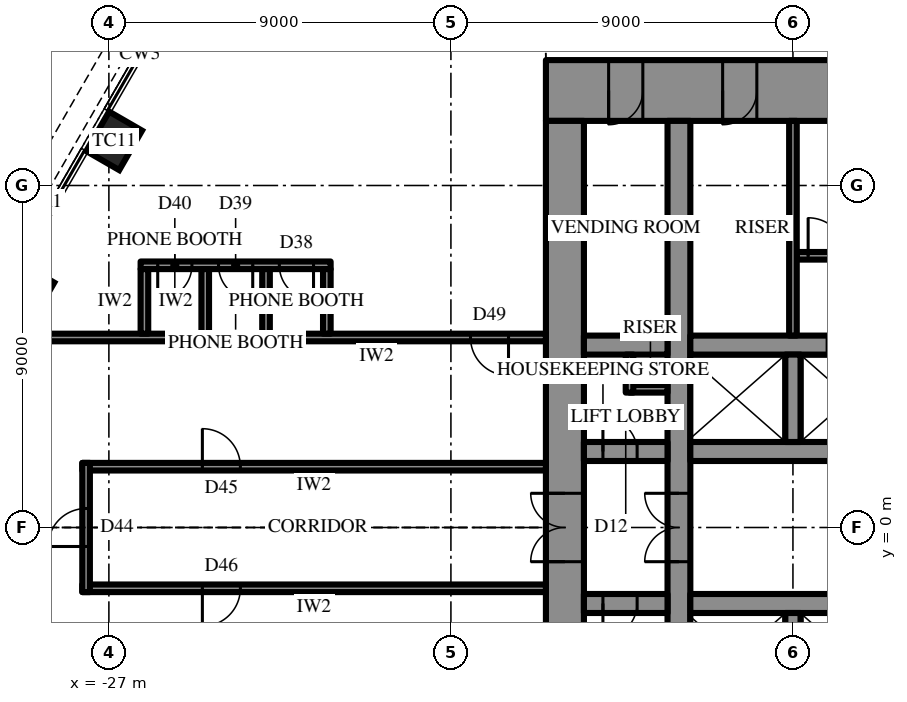
"""IFC4 building model, lengths in metres.
Left out: names, types, materials, properties, quantities, classifications, styles, units other than length and angle.
Written with IfcOpenShell. Run it as: python <this file> out.ifc"""

import sys

from ifc_helpers import new_model, si_unit, direction, frame, frame_2d, origin, origin_2d, place, context, subcontext, project, spatial, rectangle, extrude, element, fill, save


model = new_model("IFC4")
c1 = context("Model", 3, precision=1e-05, world=origin(), true_north=direction((0.0, 1.0)))
c2 = subcontext(c1, "Body", "Model", "MODEL_VIEW")
j1 = project(units=[si_unit("LENGTHUNIT", "METRE"), si_unit("PLANEANGLEUNIT", "RADIAN")], contexts=[c1])
p1 = place(None, origin())
s1 = spatial("IfcSite", under=j1, at=p1, CompositionType="ELEMENT")
p2 = place(p1, origin())
s2 = spatial("IfcBuilding", under=s1, at=p2, CompositionType="ELEMENT")
p3 = place(p2, frame((0.0, 0.0, 274.3)))
s3 = spatial("IfcBuildingStorey", under=s2, at=p3, CompositionType="ELEMENT", Elevation=274.3)
for number, where, z_axis, x_axis in (
    (1, (-26.861, 10.175, 0.0), (0.0, 0.0, 1.0), (-0.5, -0.866, 0.0)),
    (2, (-29.171, 6.175, 0.0), (0.0, 0.0, 1.0), (-0.5, -0.866, 0.0)),
):
    element("IfcColumn", number, at=place(p3, frame(where, z_axis=z_axis, x_axis=x_axis)), inside=s3, PredefinedType="COLUMN", context=c2, shape_type="SweptSolid", body=[
        extrude(rectangle(XDim=1.2, YDim=1.0, at=origin_2d()), origin(), (0.0, 0.0, 1.0), 4.2),
    ])
p4 = place(p3, frame((-15.5, 11.5, 0.0), z_axis=(0.0, 0.0, 1.0), x_axis=(1.0, 0.0, 0.0)))
e3 = element("IfcWall", 3, at=p4, inside=s3, PredefinedType="SHEAR", context=c2, shape_type="SweptSolid", body=[
    extrude(rectangle(XDim=31.0, YDim=1.6, at=frame_2d((15.5, 0.0))), origin(), (0.0, 0.0, 1.0), 4.2),
])
p5 = place(p4, frame((16.35, 0.0, 0.0)))
e4 = element("IfcOpeningElement", 4, at=p5, cuts=e3, PredefinedType="OPENING", context=c2, shape_type="SweptSolid", body=[
    extrude(rectangle(XDim=0.9, YDim=2.2, at=frame_2d((0.45, 1.1))), frame((0.0, 0.81, 0.0), z_axis=(0.0, -1.0, 0.0), x_axis=(1.0, 0.0, 0.0)), (0.0, 0.0, 1.0), 1.62),
])
p6 = place(p4, frame((19.35, 0.0, 0.0)))
e5 = element("IfcOpeningElement", 5, at=p6, cuts=e3, PredefinedType="OPENING", context=c2, shape_type="SweptSolid", body=[
    extrude(rectangle(XDim=0.9, YDim=2.2, at=frame_2d((0.45, 1.1))), frame((0.0, 0.81, 0.0), z_axis=(0.0, -1.0, 0.0), x_axis=(1.0, 0.0, 0.0)), (0.0, 0.0, 1.0), 1.62),
])
p7 = place(p4, frame((22.4, 0.0, 0.0)))
e6 = element("IfcOpeningElement", 6, at=p7, cuts=e3, PredefinedType="OPENING", context=c2, shape_type="SweptSolid", body=[
    extrude(rectangle(XDim=1.0, YDim=2.2, at=frame_2d((0.5, 1.1))), frame((0.0, 0.81, 0.0), z_axis=(0.0, -1.0, 0.0), x_axis=(1.0, 0.0, 0.0)), (0.0, 0.0, 1.0), 1.62),
])
p8 = place(p4, frame((1.65, 0.0, 0.0)))
e7 = element("IfcOpeningElement", 7, at=p8, cuts=e3, PredefinedType="OPENING", context=c2, shape_type="SweptSolid", body=[
    extrude(rectangle(XDim=0.9, YDim=2.2, at=frame_2d((0.45, 1.1))), frame((0.0, 0.81, 0.0), z_axis=(0.0, -1.0, 0.0), x_axis=(1.0, 0.0, 0.0)), (0.0, 0.0, 1.0), 1.62),
])
p9 = place(p4, frame((4.65, 0.0, 0.0)))
e8 = element("IfcOpeningElement", 8, at=p9, cuts=e3, PredefinedType="OPENING", context=c2, shape_type="SweptSolid", body=[
    extrude(rectangle(XDim=0.9, YDim=2.2, at=frame_2d((0.45, 1.1))), frame((0.0, 0.81, 0.0), z_axis=(0.0, -1.0, 0.0), x_axis=(1.0, 0.0, 0.0)), (0.0, 0.0, 1.0), 1.62),
])
p10 = place(p4, frame((25.45, 0.0, 0.0)))
e9 = element("IfcOpeningElement", 9, at=p10, cuts=e3, PredefinedType="OPENING", context=c2, shape_type="SweptSolid", body=[
    extrude(rectangle(XDim=0.9, YDim=2.2, at=frame_2d((0.45, 1.1))), frame((0.0, 0.81, 0.0), z_axis=(0.0, -1.0, 0.0), x_axis=(1.0, 0.0, 0.0)), (0.0, 0.0, 1.0), 1.62),
])
p11 = place(p4, frame((28.45, 0.0, 0.0)))
e10 = element("IfcOpeningElement", 10, at=p11, cuts=e3, PredefinedType="OPENING", context=c2, shape_type="SweptSolid", body=[
    extrude(rectangle(XDim=0.9, YDim=2.2, at=frame_2d((0.45, 1.1))), frame((0.0, 0.81, 0.0), z_axis=(0.0, -1.0, 0.0), x_axis=(1.0, 0.0, 0.0)), (0.0, 0.0, 1.0), 1.62),
])
p12 = place(p3, frame((-15.0, 10.7, 0.0), z_axis=(0.0, 0.0, 1.0), x_axis=(0.0, -1.0, 0.0)))
e11 = element("IfcWall", 11, at=p12, inside=s3, PredefinedType="SHEAR", context=c2, shape_type="SweptSolid", body=[
    extrude(rectangle(XDim=21.4, YDim=1.0, at=frame_2d((10.7, 0.0))), origin(), (0.0, 0.0, 1.0), 4.2),
])
p13 = place(p12, frame((9.8, 0.0, 0.0)))
e12 = element("IfcOpeningElement", 12, at=p13, cuts=e11, PredefinedType="OPENING", context=c2, shape_type="SweptSolid", body=[
    extrude(rectangle(XDim=1.8, YDim=2.4, at=frame_2d((0.9, 1.2))), frame((0.0, 0.51, 0.0), z_axis=(0.0, -1.0, 0.0), x_axis=(1.0, 0.0, 0.0)), (0.0, 0.0, 1.0), 1.02),
])
p14 = place(p3, frame((-12.0, -10.7, 0.0), z_axis=(0.0, 0.0, 1.0), x_axis=(0.0, 1.0, 0.0)))
e13 = element("IfcWall", 13, at=p14, inside=s3, PredefinedType="SHEAR", context=c2, shape_type="SweptSolid", body=[
    extrude(rectangle(XDim=21.4, YDim=0.6, at=frame_2d((10.7, 0.0))), origin(), (0.0, 0.0, 1.0), 4.2),
])
p15 = place(p14, frame((9.8, 0.0, 0.0)))
e14 = element("IfcOpeningElement", 14, at=p15, cuts=e13, PredefinedType="OPENING", context=c2, shape_type="SweptSolid", body=[
    extrude(rectangle(XDim=1.8, YDim=2.4, at=frame_2d((0.9, 1.2))), frame((0.0, 0.31, 0.0), z_axis=(0.0, -1.0, 0.0), x_axis=(1.0, 0.0, 0.0)), (0.0, 0.0, 1.0), 0.62),
])
p16 = place(p3, frame((-14.5, 2.0, 0.0), z_axis=(0.0, 0.0, 1.0), x_axis=(1.0, 0.0, 0.0)))
e15 = element("IfcWall", 15, at=p16, inside=s3, PredefinedType="SHEAR", context=c2, shape_type="SweptSolid", body=[
    extrude(rectangle(XDim=2.2, YDim=0.5, at=frame_2d((1.1, 0.0))), origin(), (0.0, 0.0, 1.0), 4.2),
])
p17 = place(p16, frame((0.5, 0.0, 0.0)))
e16 = element("IfcOpeningElement", 16, at=p17, cuts=e15, PredefinedType="OPENING", context=c2, shape_type="SweptSolid", body=[
    extrude(rectangle(XDim=0.9, YDim=2.2, at=frame_2d((0.45, 1.1))), frame((0.0, 0.26, 0.0), z_axis=(0.0, -1.0, 0.0), x_axis=(1.0, 0.0, 0.0)), (0.0, 0.0, 1.0), 0.52),
])
p18 = place(p3, frame((-11.7, 2.0, 0.0), z_axis=(0.0, 0.0, 1.0), x_axis=(1.0, 0.0, 0.0)))
e17 = element("IfcWall", 17, at=p18, inside=s3, PredefinedType="SHEAR", context=c2, shape_type="SweptSolid", body=[
    extrude(rectangle(XDim=5.9, YDim=0.5, at=frame_2d((2.95, 0.0))), origin(), (0.0, 0.0, 1.0), 4.2),
])
p19 = place(p3, frame((-14.5, 4.8, 0.0), z_axis=(0.0, 0.0, 1.0), x_axis=(1.0, 0.0, 0.0)))
e18 = element("IfcWall", 18, at=p19, inside=s3, PredefinedType="SHEAR", context=c2, shape_type="SweptSolid", body=[
    extrude(rectangle(XDim=2.2, YDim=0.5, at=frame_2d((1.1, 0.0))), origin(), (0.0, 0.0, 1.0), 4.2),
])
p20 = place(p3, frame((-11.7, 4.8, 0.0), z_axis=(0.0, 0.0, 1.0), x_axis=(1.0, 0.0, 0.0)))
e19 = element("IfcWall", 19, at=p20, inside=s3, PredefinedType="SHEAR", context=c2, shape_type="SweptSolid", body=[
    extrude(rectangle(XDim=23.4, YDim=0.5, at=frame_2d((11.7, 0.0))), origin(), (0.0, 0.0, 1.0), 4.2),
])
p21 = place(p20, frame((6.6, 0.0, 0.0)))
e20 = element("IfcOpeningElement", 20, at=p21, cuts=e19, PredefinedType="OPENING", context=c2, shape_type="SweptSolid", body=[
    extrude(rectangle(XDim=1.2, YDim=2.2, at=frame_2d((0.6, 1.1))), frame((0.0, 0.26, 0.0), z_axis=(0.0, -1.0, 0.0), x_axis=(1.0, 0.0, 0.0)), (0.0, 0.0, 1.0), 0.52),
])
p22 = place(p20, frame((3.6, 0.0, 0.0)))
e21 = element("IfcOpeningElement", 21, at=p22, cuts=e19, PredefinedType="OPENING", context=c2, shape_type="SweptSolid", body=[
    extrude(rectangle(XDim=1.2, YDim=2.2, at=frame_2d((0.6, 1.1))), frame((0.0, 0.26, 0.0), z_axis=(0.0, -1.0, 0.0), x_axis=(1.0, 0.0, 0.0)), (0.0, 0.0, 1.0), 0.52),
])
p23 = place(p3, frame((-9.0, 2.25, 0.0), z_axis=(0.0, 0.0, 1.0), x_axis=(0.0, 1.0, 0.0)))
e22 = element("IfcWall", 22, at=p23, inside=s3, PredefinedType="SHEAR", context=c2, shape_type="SweptSolid", body=[
    extrude(rectangle(XDim=2.3, YDim=0.4, at=frame_2d((1.15, 0.0))), origin(), (0.0, 0.0, 1.0), 4.2),
])
p24 = place(p3, frame((-8.9, 7.15, 0.0), z_axis=(0.0, 0.0, 1.0), x_axis=(1.0, 0.0, 0.0)))
e23 = element("IfcWall", 23, at=p24, inside=s3, PredefinedType="SHEAR", context=c2, shape_type="SweptSolid", body=[
    extrude(rectangle(XDim=8.6, YDim=0.2, at=frame_2d((4.3, 0.0))), origin(), (0.0, 0.0, 1.0), 4.2),
])
p25 = place(p24, frame((0.3, 0.0, 0.0)))
e24 = element("IfcOpeningElement", 24, at=p25, cuts=e23, PredefinedType="OPENING", context=c2, shape_type="SweptSolid", body=[
    extrude(rectangle(XDim=1.0, YDim=2.2, at=frame_2d((0.5, 1.1))), frame((0.0, 0.11, 0.0), z_axis=(0.0, -1.0, 0.0), x_axis=(1.0, 0.0, 0.0)), (0.0, 0.0, 1.0), 0.22),
])
p26 = place(p3, frame((3.2, -2.0, 0.0), z_axis=(0.0, 0.0, 1.0), x_axis=(-1.0, 0.0, 0.0)))
e25 = element("IfcWall", 25, at=p26, inside=s3, PredefinedType="SHEAR", context=c2, shape_type="SweptSolid", body=[
    extrude(rectangle(XDim=14.9, YDim=0.5, at=frame_2d((7.45, 0.0))), origin(), (0.0, 0.0, 1.0), 4.2),
])
p27 = place(p26, frame((1.15, 0.0, 0.0)))
e26 = element("IfcOpeningElement", 26, at=p27, cuts=e25, PredefinedType="OPENING", context=c2, shape_type="SweptSolid", body=[
    extrude(rectangle(XDim=1.1, YDim=2.2, at=frame_2d((0.55, 1.1))), frame((0.0, 0.26, 0.0), z_axis=(0.0, -1.0, 0.0), x_axis=(1.0, 0.0, 0.0)), (0.0, 0.0, 1.0), 0.52),
])
p28 = place(p26, frame((4.15, 0.0, 0.0)))
e27 = element("IfcOpeningElement", 27, at=p28, cuts=e25, PredefinedType="OPENING", context=c2, shape_type="SweptSolid", body=[
    extrude(rectangle(XDim=1.1, YDim=2.2, at=frame_2d((0.55, 1.1))), frame((0.0, 0.26, 0.0), z_axis=(0.0, -1.0, 0.0), x_axis=(1.0, 0.0, 0.0)), (0.0, 0.0, 1.0), 0.52),
])
p29 = place(p26, frame((7.15, 0.0, 0.0)))
e28 = element("IfcOpeningElement", 28, at=p29, cuts=e25, PredefinedType="OPENING", context=c2, shape_type="SweptSolid", body=[
    extrude(rectangle(XDim=1.1, YDim=2.2, at=frame_2d((0.55, 1.1))), frame((0.0, 0.26, 0.0), z_axis=(0.0, -1.0, 0.0), x_axis=(1.0, 0.0, 0.0)), (0.0, 0.0, 1.0), 0.52),
])
p30 = place(p26, frame((10.15, 0.0, 0.0)))
e29 = element("IfcOpeningElement", 29, at=p30, cuts=e25, PredefinedType="OPENING", context=c2, shape_type="SweptSolid", body=[
    extrude(rectangle(XDim=1.1, YDim=2.2, at=frame_2d((0.55, 1.1))), frame((0.0, 0.26, 0.0), z_axis=(0.0, -1.0, 0.0), x_axis=(1.0, 0.0, 0.0)), (0.0, 0.0, 1.0), 0.52),
])
p31 = place(p3, frame((-12.3, -2.0, 0.0), z_axis=(0.0, 0.0, 1.0), x_axis=(-1.0, 0.0, 0.0)))
e30 = element("IfcWall", 30, at=p31, inside=s3, PredefinedType="SHEAR", context=c2, shape_type="SweptSolid", body=[
    extrude(rectangle(XDim=2.2, YDim=0.5, at=frame_2d((1.1, 0.0))), origin(), (0.0, 0.0, 1.0), 4.2),
])
p32 = place(p31, frame((0.8, 0.0, 0.0)))
e31 = element("IfcOpeningElement", 31, at=p32, cuts=e30, PredefinedType="OPENING", context=c2, shape_type="SweptSolid", body=[
    extrude(rectangle(XDim=0.9, YDim=2.2, at=frame_2d((0.45, 1.1))), frame((0.0, 0.26, 0.0), z_axis=(0.0, -1.0, 0.0), x_axis=(1.0, 0.0, 0.0)), (0.0, 0.0, 1.0), 0.52),
])
p33 = place(p3, frame((-9.0, -2.25, 0.0), z_axis=(0.0, 0.0, 1.0), x_axis=(0.0, -1.0, 0.0)))
e32 = element("IfcWall", 32, at=p33, inside=s3, PredefinedType="SHEAR", context=c2, shape_type="SweptSolid", body=[
    extrude(rectangle(XDim=2.3, YDim=0.4, at=frame_2d((1.15, 0.0))), origin(), (0.0, 0.0, 1.0), 4.2),
])
p34 = place(p3, frame((-9.0, 5.05, 0.0), z_axis=(0.0, 0.0, 1.0), x_axis=(0.0, 1.0, 0.0)))
e33 = element("IfcWall", 33, at=p34, inside=s3, PredefinedType="PARTITIONING", context=c2, shape_type="SweptSolid", body=[
    extrude(rectangle(XDim=5.65, YDim=0.2, at=frame_2d((2.825, 0.0))), origin(), (0.0, 0.0, 1.0), 4.0),
])
for number, where, z_axis, x_axis in (
    (34, (-13.3, 3.65, 0.0), (0.0, 0.0, 1.0), (1.0, 0.0, 0.0)),
    (35, (-13.3, 3.55, 0.0), (0.0, 0.0, 1.0), (0.0, 1.0, 0.0)),
):
    element("IfcWall", number, at=place(p3, frame(where, z_axis=z_axis, x_axis=x_axis)), inside=s3, PredefinedType="PARTITIONING", context=c2, shape_type="SweptSolid", body=[
        extrude(rectangle(XDim=1.0, YDim=0.2, at=frame_2d((0.5, 0.0))), origin(), (0.0, 0.0, 1.0), 4.0),
    ])
p35 = place(p3, frame((-15.5, 1.6, 0.0), z_axis=(0.0, 0.0, 1.0), x_axis=(-1.0, 0.0, 0.0)))
e36 = element("IfcWall", 36, at=p35, inside=s3, PredefinedType="PARTITIONING", context=c2, shape_type="SweptSolid", body=[
    extrude(rectangle(XDim=12.2, YDim=0.2, at=frame_2d((6.1, 0.0))), origin(), (0.0, 0.0, 1.0), 4.0),
])
p36 = place(p35, frame((8.04, 0.0, 0.0)))
e37 = element("IfcOpeningElement", 37, at=p36, cuts=e36, PredefinedType="OPENING", context=c2, shape_type="SweptSolid", body=[
    extrude(rectangle(XDim=1.0, YDim=2.2, at=frame_2d((0.5, 1.1))), frame((0.0, 0.11, 0.0), z_axis=(0.0, -1.0, 0.0), x_axis=(1.0, 0.0, 0.0)), (0.0, 0.0, 1.0), 0.22),
])
p37 = place(p3, frame((-15.5, -1.6, 0.0), z_axis=(0.0, 0.0, 1.0), x_axis=(-1.0, 0.0, 0.0)))
e38 = element("IfcWall", 38, at=p37, inside=s3, PredefinedType="PARTITIONING", context=c2, shape_type="SweptSolid", body=[
    extrude(rectangle(XDim=12.2, YDim=0.2, at=frame_2d((6.1, 0.0))), origin(), (0.0, 0.0, 1.0), 4.0),
])
p38 = place(p37, frame((8.04, 0.0, 0.0)))
e39 = element("IfcOpeningElement", 39, at=p38, cuts=e38, PredefinedType="OPENING", context=c2, shape_type="SweptSolid", body=[
    extrude(rectangle(XDim=1.0, YDim=2.2, at=frame_2d((0.5, 1.1))), frame((0.0, 0.11, 0.0), z_axis=(0.0, -1.0, 0.0), x_axis=(1.0, 0.0, 0.0)), (0.0, 0.0, 1.0), 0.22),
])
p39 = place(p3, frame((-27.6, -1.7, 0.0), z_axis=(0.0, 0.0, 1.0), x_axis=(0.0, 1.0, 0.0)))
e40 = element("IfcWall", 40, at=p39, inside=s3, PredefinedType="PARTITIONING", context=c2, shape_type="SweptSolid", body=[
    extrude(rectangle(XDim=3.4, YDim=0.2, at=frame_2d((1.7, 0.0))), origin(), (0.0, 0.0, 1.0), 4.0),
])
p40 = place(p39, frame((1.2, 0.0, 0.0)))
e41 = element("IfcOpeningElement", 41, at=p40, cuts=e40, PredefinedType="OPENING", context=c2, shape_type="SweptSolid", body=[
    extrude(rectangle(XDim=1.0, YDim=2.2, at=frame_2d((0.5, 1.1))), frame((0.0, 0.11, 0.0), z_axis=(0.0, -1.0, 0.0), x_axis=(1.0, 0.0, 0.0)), (0.0, 0.0, 1.0), 0.22),
])
p41 = place(p3, frame((-15.5, 5.0, 0.0), z_axis=(0.0, 0.0, 1.0), x_axis=(-1.0, 0.0, 0.0)))
e42 = element("IfcWall", 42, at=p41, inside=s3, PredefinedType="PARTITIONING", context=c2, shape_type="SweptSolid", body=[
    extrude(rectangle(XDim=14.845, YDim=0.2, at=frame_2d((7.423, 0.0))), origin(), (0.0, 0.0, 1.0), 4.0),
])
p42 = place(p41, frame((0.985, 0.0, 0.0)))
e43 = element("IfcOpeningElement", 43, at=p42, cuts=e42, PredefinedType="OPENING", context=c2, shape_type="SweptSolid", body=[
    extrude(rectangle(XDim=1.0, YDim=2.2, at=frame_2d((0.5, 1.1))), frame((0.0, 0.11, 0.0), z_axis=(0.0, -1.0, 0.0), x_axis=(1.0, 0.0, 0.0)), (0.0, 0.0, 1.0), 0.22),
])
p43 = place(p3, frame((-21.165, 6.9, 0.0), z_axis=(0.0, 0.0, 1.0), x_axis=(-1.0, 0.0, 0.0)))
e44 = element("IfcWall", 44, at=p43, inside=s3, PredefinedType="PARTITIONING", context=c2, shape_type="SweptSolid", body=[
    extrude(rectangle(XDim=5.0, YDim=0.2, at=frame_2d((2.5, 0.0))), origin(), (0.0, 0.0, 1.0), 4.0),
])
p44 = place(p43, frame((0.45, 0.0, 0.0)))
e45 = element("IfcOpeningElement", 45, at=p44, cuts=e44, PredefinedType="OPENING", context=c2, shape_type="SweptSolid", body=[
    extrude(rectangle(XDim=0.9, YDim=2.2, at=frame_2d((0.45, 1.1))), frame((0.0, 0.11, 0.0), z_axis=(0.0, -1.0, 0.0), x_axis=(1.0, 0.0, 0.0)), (0.0, 0.0, 1.0), 0.22),
])
p45 = place(p43, frame((2.05, 0.0, 0.0)))
e46 = element("IfcOpeningElement", 46, at=p45, cuts=e44, PredefinedType="OPENING", context=c2, shape_type="SweptSolid", body=[
    extrude(rectangle(XDim=0.9, YDim=2.2, at=frame_2d((0.45, 1.1))), frame((0.0, 0.11, 0.0), z_axis=(0.0, -1.0, 0.0), x_axis=(1.0, 0.0, 0.0)), (0.0, 0.0, 1.0), 0.22),
])
p46 = place(p43, frame((3.65, 0.0, 0.0)))
e47 = element("IfcOpeningElement", 47, at=p46, cuts=e44, PredefinedType="OPENING", context=c2, shape_type="SweptSolid", body=[
    extrude(rectangle(XDim=0.9, YDim=2.2, at=frame_2d((0.45, 1.1))), frame((0.0, 0.11, 0.0), z_axis=(0.0, -1.0, 0.0), x_axis=(1.0, 0.0, 0.0)), (0.0, 0.0, 1.0), 0.22),
])
for number, where, z_axis, x_axis in (
    (48, (-21.265, 5.1, 0.0), (0.0, 0.0, 1.0), (0.0, 1.0, 0.0)),
    (49, (-22.865, 5.1, 0.0), (0.0, 0.0, 1.0), (0.0, 1.0, 0.0)),
    (50, (-24.465, 5.1, 0.0), (0.0, 0.0, 1.0), (0.0, 1.0, 0.0)),
    (51, (-26.065, 5.1, 0.0), (0.0, 0.0, 1.0), (0.0, 1.0, 0.0)),
):
    element("IfcWall", number, at=place(p3, frame(where, z_axis=z_axis, x_axis=x_axis)), inside=s3, PredefinedType="PARTITIONING", context=c2, shape_type="SweptSolid", body=[
        extrude(rectangle(XDim=1.7, YDim=0.2, at=frame_2d((0.85, 0.0))), origin(), (0.0, 0.0, 1.0), 4.0),
    ])
p47 = place(p13, frame((1.8, 0.0, 0.0), z_axis=(0.0, 0.0, 1.0), x_axis=(-1.0, 0.0, 0.0)))
e52 = element("IfcDoor", 52, at=p47, inside=s3, OperationType="DOUBLE_DOOR_SINGLE_SWING", PredefinedType="DOOR", context=c2, shape_type="SweptSolid", body=[
    extrude(rectangle(XDim=1.8, YDim=2.4, at=frame_2d((0.9, 1.2))), frame((0.0, 0.025, 0.0), z_axis=(0.0, -1.0, 0.0), x_axis=(1.0, 0.0, 0.0)), (0.0, 0.0, 1.0), 0.05),
])
fill(e12, e52)
p48 = place(p25, origin())
e53 = element("IfcDoor", 53, at=p48, inside=s3, OperationType="SINGLE_SWING_RIGHT", PredefinedType="DOOR", context=c2, shape_type="SweptSolid", body=[
    extrude(rectangle(XDim=1.0, YDim=2.2, at=frame_2d((0.5, 1.1))), frame((0.0, 0.025, 0.0), z_axis=(0.0, -1.0, 0.0), x_axis=(1.0, 0.0, 0.0)), (0.0, 0.0, 1.0), 0.05),
])
fill(e24, e53)
p49 = place(p8, frame((0.9, 0.0, 0.0), z_axis=(0.0, 0.0, 1.0), x_axis=(-1.0, 0.0, 0.0)))
e54 = element("IfcDoor", 54, at=p49, inside=s3, OperationType="SINGLE_SWING_LEFT", PredefinedType="DOOR", context=c2, shape_type="SweptSolid", body=[
    extrude(rectangle(XDim=0.9, YDim=2.2, at=frame_2d((0.45, 1.1))), frame((0.0, 0.025, 0.0), z_axis=(0.0, -1.0, 0.0), x_axis=(1.0, 0.0, 0.0)), (0.0, 0.0, 1.0), 0.05),
])
fill(e7, e54)
p50 = place(p9, frame((0.9, 0.0, 0.0), z_axis=(0.0, 0.0, 1.0), x_axis=(-1.0, 0.0, 0.0)))
e55 = element("IfcDoor", 55, at=p50, inside=s3, OperationType="SINGLE_SWING_LEFT", PredefinedType="DOOR", context=c2, shape_type="SweptSolid", body=[
    extrude(rectangle(XDim=0.9, YDim=2.2, at=frame_2d((0.45, 1.1))), frame((0.0, 0.025, 0.0), z_axis=(0.0, -1.0, 0.0), x_axis=(1.0, 0.0, 0.0)), (0.0, 0.0, 1.0), 0.05),
])
fill(e8, e55)
p51 = place(p17, origin())
e56 = element("IfcDoor", 56, at=p51, inside=s3, OperationType="SINGLE_SWING_RIGHT", PredefinedType="DOOR", context=c2, shape_type="SweptSolid", body=[
    extrude(rectangle(XDim=0.9, YDim=2.2, at=frame_2d((0.45, 1.1))), frame((0.0, 0.025, 0.0), z_axis=(0.0, -1.0, 0.0), x_axis=(1.0, 0.0, 0.0)), (0.0, 0.0, 1.0), 0.05),
])
fill(e16, e56)
p52 = place(p32, origin())
e57 = element("IfcDoor", 57, at=p52, inside=s3, OperationType="SINGLE_SWING_LEFT", PredefinedType="DOOR", context=c2, shape_type="SweptSolid", body=[
    extrude(rectangle(XDim=0.9, YDim=2.2, at=frame_2d((0.45, 1.1))), frame((0.0, 0.025, 0.0), z_axis=(0.0, -1.0, 0.0), x_axis=(1.0, 0.0, 0.0)), (0.0, 0.0, 1.0), 0.05),
])
fill(e31, e57)
p53 = place(p15, origin())
e58 = element("IfcDoor", 58, at=p53, inside=s3, OperationType="DOUBLE_DOOR_SINGLE_SWING", PredefinedType="DOOR", context=c2, shape_type="SweptSolid", body=[
    extrude(rectangle(XDim=1.8, YDim=2.4, at=frame_2d((0.9, 1.2))), frame((0.0, 0.025, 0.0), z_axis=(0.0, -1.0, 0.0), x_axis=(1.0, 0.0, 0.0)), (0.0, 0.0, 1.0), 0.05),
])
fill(e14, e58)
p54 = place(p36, frame((1.0, 0.0, 0.0), z_axis=(0.0, 0.0, 1.0), x_axis=(-1.0, 0.0, 0.0)))
e59 = element("IfcDoor", 59, at=p54, inside=s3, OperationType="SINGLE_SWING_RIGHT", PredefinedType="DOOR", context=c2, shape_type="SweptSolid", body=[
    extrude(rectangle(XDim=1.0, YDim=2.2, at=frame_2d((0.5, 1.1))), frame((0.0, 0.025, 0.0), z_axis=(0.0, -1.0, 0.0), x_axis=(1.0, 0.0, 0.0)), (0.0, 0.0, 1.0), 0.05),
])
fill(e37, e59)
p55 = place(p38, origin())
e60 = element("IfcDoor", 60, at=p55, inside=s3, OperationType="SINGLE_SWING_LEFT", PredefinedType="DOOR", context=c2, shape_type="SweptSolid", body=[
    extrude(rectangle(XDim=1.0, YDim=2.2, at=frame_2d((0.5, 1.1))), frame((0.0, 0.025, 0.0), z_axis=(0.0, -1.0, 0.0), x_axis=(1.0, 0.0, 0.0)), (0.0, 0.0, 1.0), 0.05),
])
fill(e39, e60)
p56 = place(p40, origin())
e61 = element("IfcDoor", 61, at=p56, inside=s3, OperationType="SINGLE_SWING_RIGHT", PredefinedType="DOOR", context=c2, shape_type="SweptSolid", body=[
    extrude(rectangle(XDim=1.0, YDim=2.2, at=frame_2d((0.5, 1.1))), frame((0.0, 0.025, 0.0), z_axis=(0.0, -1.0, 0.0), x_axis=(1.0, 0.0, 0.0)), (0.0, 0.0, 1.0), 0.05),
])
fill(e41, e61)
p57 = place(p42, origin())
e62 = element("IfcDoor", 62, at=p57, inside=s3, OperationType="SINGLE_SWING_RIGHT", PredefinedType="DOOR", context=c2, shape_type="SweptSolid", body=[
    extrude(rectangle(XDim=1.0, YDim=2.2, at=frame_2d((0.5, 1.1))), frame((0.0, 0.025, 0.0), z_axis=(0.0, -1.0, 0.0), x_axis=(1.0, 0.0, 0.0)), (0.0, 0.0, 1.0), 0.05),
])
fill(e43, e62)
p58 = place(p44, origin())
e63 = element("IfcDoor", 63, at=p58, inside=s3, OperationType="SINGLE_SWING_RIGHT", PredefinedType="DOOR", context=c2, shape_type="SweptSolid", body=[
    extrude(rectangle(XDim=0.9, YDim=2.2, at=frame_2d((0.45, 1.1))), frame((0.0, 0.025, 0.0), z_axis=(0.0, -1.0, 0.0), x_axis=(1.0, 0.0, 0.0)), (0.0, 0.0, 1.0), 0.05),
])
fill(e45, e63)
p59 = place(p45, origin())
e64 = element("IfcDoor", 64, at=p59, inside=s3, OperationType="SINGLE_SWING_RIGHT", PredefinedType="DOOR", context=c2, shape_type="SweptSolid", body=[
    extrude(rectangle(XDim=0.9, YDim=2.2, at=frame_2d((0.45, 1.1))), frame((0.0, 0.025, 0.0), z_axis=(0.0, -1.0, 0.0), x_axis=(1.0, 0.0, 0.0)), (0.0, 0.0, 1.0), 0.05),
])
fill(e46, e64)
p60 = place(p46, origin())
e65 = element("IfcDoor", 65, at=p60, inside=s3, OperationType="SINGLE_SWING_LEFT", PredefinedType="DOOR", context=c2, shape_type="SweptSolid", body=[
    extrude(rectangle(XDim=0.9, YDim=2.2, at=frame_2d((0.45, 1.1))), frame((0.0, 0.025, 0.0), z_axis=(0.0, -1.0, 0.0), x_axis=(1.0, 0.0, 0.0)), (0.0, 0.0, 1.0), 0.05),
])
fill(e47, e65)
save(model, sys.argv[1])
